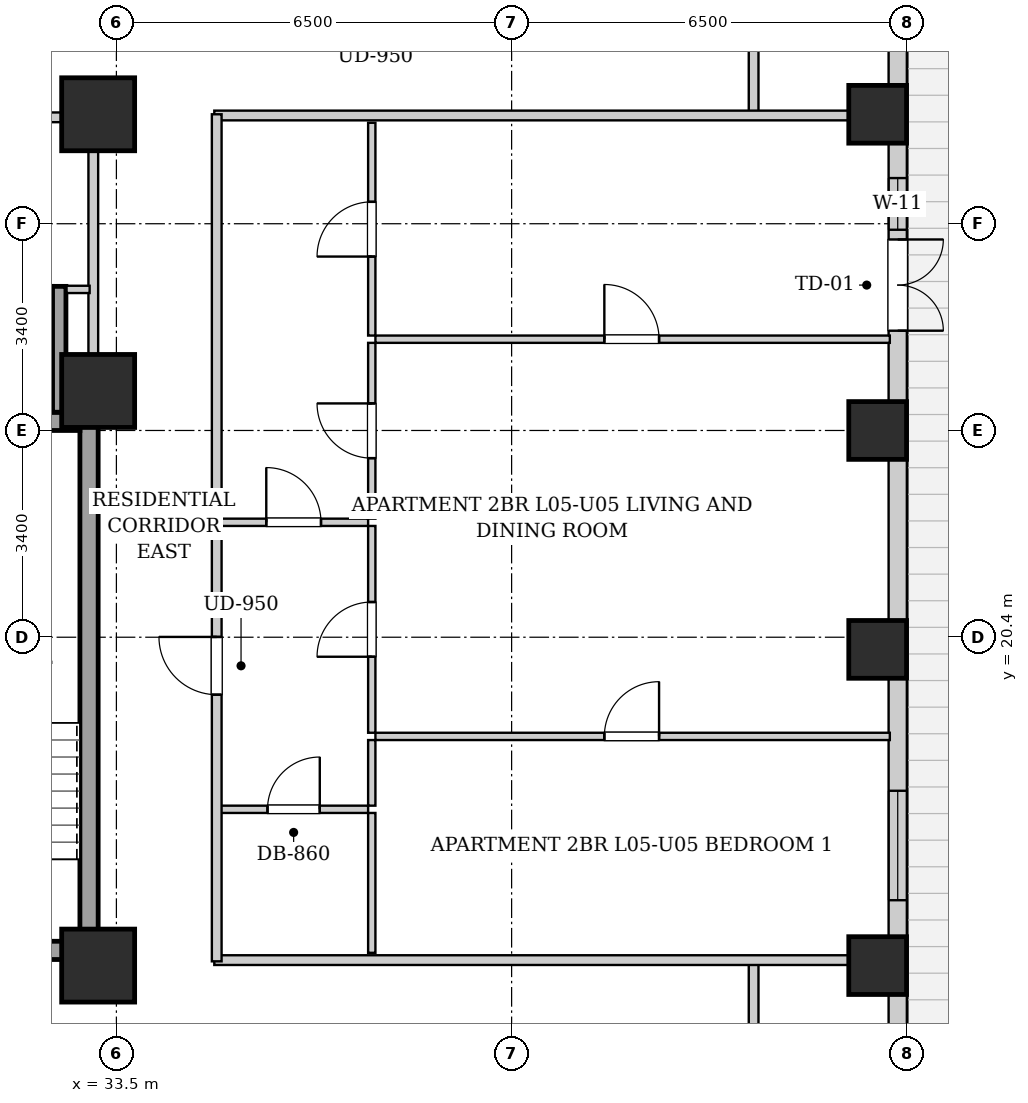
"""IFC4 building model, lengths in metres.
Left out: names, types, materials, properties, quantities, classifications, styles, units other than length and angle.
Written with IfcOpenShell. Run it as: python <this file> out.ifc"""

import sys

from ifc_helpers import new_model, si_unit, direction, frame, frame_2d, origin, origin_2d, place, context, subcontext, project, spatial, rectangle, extrude, element, fill, save


model = new_model("IFC4")
c1 = context("Model", 3, precision=1e-05, world=origin(), true_north=direction((0.0, 1.0)))
c2 = subcontext(c1, "Body", "Model", "MODEL_VIEW")
j1 = project(units=[si_unit("LENGTHUNIT", "METRE"), si_unit("PLANEANGLEUNIT", "RADIAN")], contexts=[c1])
p1 = place(None, origin())
s1 = spatial("IfcSite", under=j1, at=p1, CompositionType="ELEMENT")
p2 = place(p1, origin())
s2 = spatial("IfcBuilding", under=s1, at=p2, CompositionType="ELEMENT")
p3 = place(p2, frame((0.0, 0.0, 25.8)))
s3 = spatial("IfcBuildingStorey", under=s2, at=p3, CompositionType="ELEMENT", Elevation=25.8)
for number, where, z_axis, x_axis in (
    (1, (46.02, 15.0, 0.0), (0.0, 0.0, 1.0), (1.0, 0.0, 0.0)),
    (2, (46.02, 20.2, 0.0), (0.0, 0.0, 1.0), (1.0, 0.0, 0.0)),
    (3, (46.02, 23.8, 0.0), (0.0, 0.0, 1.0), (1.0, 0.0, 0.0)),
    (4, (46.02, 29.0, 0.0), (0.0, 0.0, 1.0), (1.0, 0.0, 0.0)),
):
    element("IfcColumn", number, at=place(p3, frame(where, z_axis=z_axis, x_axis=x_axis)), inside=s3, PredefinedType="COLUMN", context=c2, shape_type="SweptSolid", body=[
        extrude(rectangle(XDim=0.95, YDim=0.95, at=origin_2d()), origin(), (0.0, 0.0, 1.0), 3.2),
    ])
for number, where, z_axis, x_axis in (
    (5, (33.2, 15.0, 0.0), (0.0, 0.0, 1.0), (1.0, 0.0, 0.0)),
    (6, (33.2, 29.0, 0.0), (0.0, 0.0, 1.0), (1.0, 0.0, 0.0)),
    (7, (33.2, 24.45, 0.0), (0.0, 0.0, 1.0), (1.0, 0.0, 0.0)),
):
    element("IfcColumn", number, at=place(p3, frame(where, z_axis=z_axis, x_axis=x_axis)), inside=s3, PredefinedType="COLUMN", context=c2, shape_type="SweptSolid", body=[
        extrude(rectangle(XDim=1.2, YDim=1.2, at=origin_2d()), origin(), (0.0, 0.0, 1.0), 3.2),
    ])
p4 = place(p3, frame((46.35, 45.1, 0.0), z_axis=(0.0, 0.0, 1.0), x_axis=(0.0, -1.0, 0.0)))
e8 = element("IfcWall", 8, at=p4, inside=s3, PredefinedType="SOLIDWALL", context=c2, shape_type="SweptSolid", body=[
    extrude(rectangle(XDim=42.6, YDim=0.3, at=frame_2d((21.3, 0.0))), origin(), (0.0, 0.0, 1.0), 1.988),
])
p5 = place(p4, frame((18.159, 0.0, 0.0)))
e9 = element("IfcOpeningElement", 9, at=p5, cuts=e8, PredefinedType="OPENING", context=c2, shape_type="SweptSolid", body=[
    extrude(rectangle(XDim=1.5, YDim=1.982, at=frame_2d((0.75, 0.991))), frame((0.0, 0.16, 0.0), z_axis=(0.0, -1.0, 0.0), x_axis=(1.0, 0.0, 0.0)), (0.0, 0.0, 1.0), 0.32),
])
p6 = place(p4, frame((37.575, 0.0, 0.55)))
e10 = element("IfcOpeningElement", 10, at=p6, cuts=e8, PredefinedType="OPENING", context=c2, shape_type="SweptSolid", body=[
    extrude(rectangle(XDim=1.8, YDim=1.2, at=frame_2d((0.9, 0.6))), frame((0.0, 0.16, 0.0), z_axis=(0.0, -1.0, 0.0), x_axis=(1.0, 0.0, 0.0)), (0.0, 0.0, 1.0), 0.32),
])
p7 = place(p4, frame((34.85, 0.0, 0.55)))
e11 = element("IfcOpeningElement", 11, at=p7, cuts=e8, PredefinedType="OPENING", context=c2, shape_type="SweptSolid", body=[
    extrude(rectangle(XDim=1.35, YDim=1.2, at=frame_2d((0.675, 0.6))), frame((0.0, 0.16, 0.0), z_axis=(0.0, -1.0, 0.0), x_axis=(1.0, 0.0, 0.0)), (0.0, 0.0, 1.0), 0.32),
])
p8 = place(p4, frame((3.665, 0.0, 0.55)))
e12 = element("IfcOpeningElement", 12, at=p8, cuts=e8, PredefinedType="OPENING", context=c2, shape_type="SweptSolid", body=[
    extrude(rectangle(XDim=1.8, YDim=1.2, at=frame_2d((0.9, 0.6))), frame((0.0, 0.16, 0.0), z_axis=(0.0, -1.0, 0.0), x_axis=(1.0, 0.0, 0.0)), (0.0, 0.0, 1.0), 0.32),
])
p9 = place(p4, frame((1.185, 0.0, 0.55)))
e13 = element("IfcOpeningElement", 13, at=p9, cuts=e8, PredefinedType="OPENING", context=c2, shape_type="SweptSolid", body=[
    extrude(rectangle(XDim=1.35, YDim=1.2, at=frame_2d((0.675, 0.6))), frame((0.0, 0.16, 0.0), z_axis=(0.0, -1.0, 0.0), x_axis=(1.0, 0.0, 0.0)), (0.0, 0.0, 1.0), 0.32),
])
p10 = place(p4, frame((27.225, 0.0, 0.55)))
e14 = element("IfcOpeningElement", 14, at=p10, cuts=e8, PredefinedType="OPENING", context=c2, shape_type="SweptSolid", body=[
    extrude(rectangle(XDim=1.8, YDim=1.2, at=frame_2d((0.9, 0.6))), frame((0.0, 0.16, 0.0), z_axis=(0.0, -1.0, 0.0), x_axis=(1.0, 0.0, 0.0)), (0.0, 0.0, 1.0), 0.32),
])
p11 = place(p4, frame((17.149, 0.0, 0.55)))
e15 = element("IfcOpeningElement", 15, at=p11, cuts=e8, PredefinedType="OPENING", context=c2, shape_type="SweptSolid", body=[
    extrude(rectangle(XDim=0.85, YDim=1.2, at=frame_2d((0.425, 0.6))), frame((0.0, 0.16, 0.0), z_axis=(0.0, -1.0, 0.0), x_axis=(1.0, 0.0, 0.0)), (0.0, 0.0, 1.0), 0.32),
])
p12 = place(p3, frame((33.05, 15.1, 0.0), z_axis=(0.0, 0.0, 1.0), x_axis=(0.0, 1.0, 0.0)))
e16 = element("IfcWall", 16, at=p12, inside=s3, PredefinedType="SHEAR", context=c2, shape_type="SweptSolid", body=[
    extrude(rectangle(XDim=9.0, YDim=0.3, at=frame_2d((4.5, 0.0))), origin(), (0.0, 0.0, 1.0), 2.94),
])
p13 = place(p3, frame((30.05, 23.95, 0.0), z_axis=(0.0, 0.0, 1.0), x_axis=(1.0, 0.0, 0.0)))
e17 = element("IfcWall", 17, at=p13, inside=s3, PredefinedType="SHEAR", context=c2, shape_type="SweptSolid", body=[
    extrude(rectangle(XDim=2.85, YDim=0.3, at=frame_2d((1.425, 0.0))), origin(), (0.0, 0.0, 1.0), 2.94),
])
p14 = place(p3, frame((30.05, 15.25, 0.0), z_axis=(0.0, 0.0, 1.0), x_axis=(1.0, 0.0, 0.0)))
e18 = element("IfcWall", 18, at=p14, inside=s3, PredefinedType="SHEAR", context=c2, shape_type="SweptSolid", body=[
    extrude(rectangle(XDim=2.85, YDim=0.3, at=frame_2d((1.425, 0.0))), origin(), (0.0, 0.0, 1.0), 2.94),
])
p15 = place(p14, frame((0.86, 0.0, 0.0)))
e19 = element("IfcOpeningElement", 19, at=p15, cuts=e18, PredefinedType="OPENING", context=c2, shape_type="SweptSolid", body=[
    extrude(rectangle(XDim=1.1, YDim=2.05, at=frame_2d((0.55, 1.025))), frame((0.0, 0.16, 0.0), z_axis=(0.0, -1.0, 0.0), x_axis=(1.0, 0.0, 0.0)), (0.0, 0.0, 1.0), 0.32),
])
p16 = place(p3, frame((32.56, 24.1, 0.0), z_axis=(0.0, 0.0, 1.0), x_axis=(0.0, 1.0, 0.0)))
e20 = element("IfcWall", 20, at=p16, inside=s3, PredefinedType="SHEAR", context=c2, shape_type="SweptSolid", body=[
    extrude(rectangle(XDim=2.07, YDim=0.22, at=frame_2d((1.035, 0.0))), origin(), (0.0, 0.0, 1.0), 2.94),
])
p17 = place(p3, frame((33.12, 24.12, 0.0), z_axis=(0.0, 0.0, 1.0), x_axis=(0.0, 1.0, 0.0)))
e21 = element("IfcWall", 21, at=p17, inside=s3, PredefinedType="PARTITIONING", context=c2, shape_type="SweptSolid", body=[
    extrude(rectangle(XDim=4.76, YDim=0.16, at=frame_2d((2.38, 0.0))), origin(), (0.0, 0.0, 1.0), 2.94),
])
p18 = place(p3, frame((32.68, 26.12, 0.0), z_axis=(0.0, 0.0, 1.0), x_axis=(1.0, 0.0, 0.0)))
e22 = element("IfcWall", 22, at=p18, inside=s3, PredefinedType="PARTITIONING", context=c2, shape_type="SweptSolid", body=[
    extrude(rectangle(XDim=0.38, YDim=0.12, at=frame_2d((0.19, 0.0))), origin(), (0.0, 0.0, 1.0), 2.94),
])
p19 = place(p3, frame((30.08, 28.95, 0.0), z_axis=(0.0, 0.0, 1.0), x_axis=(1.0, 0.0, 0.0)))
e23 = element("IfcWall", 23, at=p19, inside=s3, PredefinedType="PARTITIONING", context=c2, shape_type="SweptSolid", body=[
    extrude(rectangle(XDim=2.96, YDim=0.16, at=frame_2d((1.48, 0.0))), origin(), (0.0, 0.0, 1.0), 2.94),
])
p20 = place(p19, frame((1.045, 0.0, 0.0)))
e24 = element("IfcOpeningElement", 24, at=p20, cuts=e23, PredefinedType="OPENING", context=c2, shape_type="SweptSolid", body=[
    extrude(rectangle(XDim=0.86, YDim=2.05, at=frame_2d((0.43, 1.025))), frame((0.0, 0.09, 0.0), z_axis=(0.0, -1.0, 0.0), x_axis=(1.0, 0.0, 0.0)), (0.0, 0.0, 1.0), 0.18),
])
for number, where, z_axis, x_axis in (
    (25, (43.98, 13.35, 0.0), (0.0, 0.0, 1.0), (0.0, 1.0, 0.0)),
    (26, (43.98, 28.98, 0.0), (0.0, 0.0, 1.0), (0.0, 1.0, 0.0)),
):
    element("IfcWall", number, at=place(p3, frame(where, z_axis=z_axis, x_axis=x_axis)), inside=s3, PredefinedType="PARTITIONING", context=c2, shape_type="SweptSolid", body=[
        extrude(rectangle(XDim=1.74, YDim=0.16, at=frame_2d((0.87, 0.0))), origin(), (0.0, 0.0, 1.0), 2.94),
    ])
for number, where, z_axis, x_axis in (
    (27, (35.11, 15.09, 0.0), (0.0, 0.0, 1.0), (1.0, 0.0, 0.0)),
    (28, (35.11, 28.98, 0.0), (0.0, 0.0, 1.0), (1.0, 0.0, 0.0)),
):
    element("IfcWall", number, at=place(p3, frame(where, z_axis=z_axis, x_axis=x_axis)), inside=s3, PredefinedType="PARTITIONING", context=c2, shape_type="SweptSolid", body=[
        extrude(rectangle(XDim=11.11, YDim=0.16, at=frame_2d((5.555, 0.0))), origin(), (0.0, 0.0, 1.0), 2.155),
    ])
p21 = place(p3, frame((35.19, 22.29, 0.0), z_axis=(0.0, 0.0, 1.0), x_axis=(1.0, 0.0, 0.0)))
e29 = element("IfcWall", 29, at=p21, inside=s3, PredefinedType="PARTITIONING", context=c2, shape_type="SweptSolid", body=[
    extrude(rectangle(XDim=2.45, YDim=0.12, at=frame_2d((1.225, 0.0))), origin(), (0.0, 0.0, 1.0), 2.94),
])
p22 = place(p21, frame((0.775, 0.0, 0.0)))
e30 = element("IfcOpeningElement", 30, at=p22, cuts=e29, PredefinedType="OPENING", context=c2, shape_type="SweptSolid", body=[
    extrude(rectangle(XDim=0.9, YDim=2.05, at=frame_2d((0.45, 1.025))), frame((0.0, 0.07, 0.0), z_axis=(0.0, -1.0, 0.0), x_axis=(1.0, 0.0, 0.0)), (0.0, 0.0, 1.0), 0.14),
])
p23 = place(p3, frame((37.7, 22.35, 0.0), z_axis=(0.0, 0.0, 1.0), x_axis=(0.0, 1.0, 0.0)))
e31 = element("IfcWall", 31, at=p23, inside=s3, PredefinedType="PARTITIONING", context=c2, shape_type="SweptSolid", body=[
    extrude(rectangle(XDim=2.891, YDim=0.12, at=frame_2d((1.445, 0.0))), origin(), (0.0, 0.0, 1.0), 2.94),
])
p24 = place(p23, frame((0.995, 0.0, 0.0)))
e32 = element("IfcOpeningElement", 32, at=p24, cuts=e31, PredefinedType="OPENING", context=c2, shape_type="SweptSolid", body=[
    extrude(rectangle(XDim=0.9, YDim=2.05, at=frame_2d((0.45, 1.025))), frame((0.0, 0.07, 0.0), z_axis=(0.0, -1.0, 0.0), x_axis=(1.0, 0.0, 0.0)), (0.0, 0.0, 1.0), 0.14),
])
p25 = place(p3, frame((37.7, 25.361, 0.0), z_axis=(0.0, 0.0, 1.0), x_axis=(0.0, 1.0, 0.0)))
e33 = element("IfcWall", 33, at=p25, inside=s3, PredefinedType="PARTITIONING", context=c2, shape_type="SweptSolid", body=[
    extrude(rectangle(XDim=3.499, YDim=0.12, at=frame_2d((1.75, 0.0))), origin(), (0.0, 0.0, 1.0), 2.94),
])
p26 = place(p25, frame((1.299, 0.0, 0.0)))
e34 = element("IfcOpeningElement", 34, at=p26, cuts=e33, PredefinedType="OPENING", context=c2, shape_type="SweptSolid", body=[
    extrude(rectangle(XDim=0.9, YDim=2.05, at=frame_2d((0.45, 1.025))), frame((0.0, 0.07, 0.0), z_axis=(0.0, -1.0, 0.0), x_axis=(1.0, 0.0, 0.0)), (0.0, 0.0, 1.0), 0.14),
])
p27 = place(p3, frame((35.19, 17.57, 0.0), z_axis=(0.0, 0.0, 1.0), x_axis=(1.0, 0.0, 0.0)))
e35 = element("IfcWall", 35, at=p27, inside=s3, PredefinedType="PARTITIONING", context=c2, shape_type="SweptSolid", body=[
    extrude(rectangle(XDim=2.45, YDim=0.12, at=frame_2d((1.225, 0.0))), origin(), (0.0, 0.0, 1.0), 2.94),
])
p28 = place(p27, frame((0.795, 0.0, 0.0)))
e36 = element("IfcOpeningElement", 36, at=p28, cuts=e35, PredefinedType="OPENING", context=c2, shape_type="SweptSolid", body=[
    extrude(rectangle(XDim=0.86, YDim=2.05, at=frame_2d((0.43, 1.025))), frame((0.0, 0.07, 0.0), z_axis=(0.0, -1.0, 0.0), x_axis=(1.0, 0.0, 0.0)), (0.0, 0.0, 1.0), 0.14),
])
p29 = place(p3, frame((37.7, 15.21, 0.0), z_axis=(0.0, 0.0, 1.0), x_axis=(0.0, 1.0, 0.0)))
e37 = element("IfcWall", 37, at=p29, inside=s3, PredefinedType="PARTITIONING", context=c2, shape_type="SweptSolid", body=[
    extrude(rectangle(XDim=2.3, YDim=0.12, at=frame_2d((1.15, 0.0))), origin(), (0.0, 0.0, 1.0), 2.94),
])
p30 = place(p3, frame((37.7, 17.63, 0.0), z_axis=(0.0, 0.0, 1.0), x_axis=(0.0, 1.0, 0.0)))
e38 = element("IfcWall", 38, at=p30, inside=s3, PredefinedType="PARTITIONING", context=c2, shape_type="SweptSolid", body=[
    extrude(rectangle(XDim=1.079, YDim=0.12, at=frame_2d((0.54, 0.0))), origin(), (0.0, 0.0, 1.0), 2.94),
])
p31 = place(p3, frame((37.7, 18.829, 0.0), z_axis=(0.0, 0.0, 1.0), x_axis=(0.0, 1.0, 0.0)))
e39 = element("IfcWall", 39, at=p31, inside=s3, PredefinedType="PARTITIONING", context=c2, shape_type="SweptSolid", body=[
    extrude(rectangle(XDim=3.401, YDim=0.12, at=frame_2d((1.7, 0.0))), origin(), (0.0, 0.0, 1.0), 2.94),
])
p32 = place(p31, frame((1.25, 0.0, 0.0)))
e40 = element("IfcOpeningElement", 40, at=p32, cuts=e39, PredefinedType="OPENING", context=c2, shape_type="SweptSolid", body=[
    extrude(rectangle(XDim=0.9, YDim=2.05, at=frame_2d((0.45, 1.025))), frame((0.0, 0.07, 0.0), z_axis=(0.0, -1.0, 0.0), x_axis=(1.0, 0.0, 0.0)), (0.0, 0.0, 1.0), 0.14),
])
p33 = place(p3, frame((37.76, 18.769, 0.0), z_axis=(0.0, 0.0, 1.0), x_axis=(1.0, 0.0, 0.0)))
e41 = element("IfcWall", 41, at=p33, inside=s3, PredefinedType="PARTITIONING", context=c2, shape_type="SweptSolid", body=[
    extrude(rectangle(XDim=8.46, YDim=0.12, at=frame_2d((4.23, 0.0))), origin(), (0.0, 0.0, 1.0), 2.94),
])
p34 = place(p33, frame((3.765, 0.0, 0.0)))
e42 = element("IfcOpeningElement", 42, at=p34, cuts=e41, PredefinedType="OPENING", context=c2, shape_type="SweptSolid", body=[
    extrude(rectangle(XDim=0.9, YDim=2.05, at=frame_2d((0.45, 1.025))), frame((0.0, 0.07, 0.0), z_axis=(0.0, -1.0, 0.0), x_axis=(1.0, 0.0, 0.0)), (0.0, 0.0, 1.0), 0.14),
])
p35 = place(p3, frame((37.76, 25.301, 0.0), z_axis=(0.0, 0.0, 1.0), x_axis=(1.0, 0.0, 0.0)))
e43 = element("IfcWall", 43, at=p35, inside=s3, PredefinedType="PARTITIONING", context=c2, shape_type="SweptSolid", body=[
    extrude(rectangle(XDim=8.46, YDim=0.12, at=frame_2d((4.23, 0.0))), origin(), (0.0, 0.0, 1.0), 2.94),
])
p36 = place(p35, frame((3.765, 0.0, 0.0)))
e44 = element("IfcOpeningElement", 44, at=p36, cuts=e43, PredefinedType="OPENING", context=c2, shape_type="SweptSolid", body=[
    extrude(rectangle(XDim=0.9, YDim=2.05, at=frame_2d((0.45, 1.025))), frame((0.0, 0.07, 0.0), z_axis=(0.0, -1.0, 0.0), x_axis=(1.0, 0.0, 0.0)), (0.0, 0.0, 1.0), 0.14),
])
p37 = place(p3, frame((35.15, 15.07, 0.0), z_axis=(0.0, 0.0, 1.0), x_axis=(0.0, 1.0, 0.0)))
e45 = element("IfcWall", 45, at=p37, inside=s3, PredefinedType="PARTITIONING", context=c2, shape_type="SweptSolid", body=[
    extrude(rectangle(XDim=13.93, YDim=0.16, at=frame_2d((6.965, 0.0))), origin(), (0.0, 0.0, 1.0), 2.94),
])
p38 = place(p37, frame((4.385, 0.0, 0.0)))
e46 = element("IfcOpeningElement", 46, at=p38, cuts=e45, PredefinedType="OPENING", context=c2, shape_type="SweptSolid", body=[
    extrude(rectangle(XDim=0.95, YDim=2.1, at=frame_2d((0.475, 1.05))), frame((0.0, 0.09, 0.0), z_axis=(0.0, -1.0, 0.0), x_axis=(1.0, 0.0, 0.0)), (0.0, 0.0, 1.0), 0.18),
])
p39 = place(p22, origin())
e47 = element("IfcDoor", 47, at=p39, inside=s3, OperationType="SINGLE_SWING_LEFT", PredefinedType="DOOR", context=c2, shape_type="SweptSolid", body=[
    extrude(rectangle(XDim=0.9, YDim=2.05, at=frame_2d((0.45, 1.025))), frame((0.0, 0.025, 0.0), z_axis=(0.0, -1.0, 0.0), x_axis=(1.0, 0.0, 0.0)), (0.0, 0.0, 1.0), 0.05),
])
fill(e30, e47)
p40 = place(p24, origin())
e48 = element("IfcDoor", 48, at=p40, inside=s3, OperationType="SINGLE_SWING_RIGHT", PredefinedType="DOOR", context=c2, shape_type="SweptSolid", body=[
    extrude(rectangle(XDim=0.9, YDim=2.05, at=frame_2d((0.45, 1.025))), frame((0.0, 0.025, 0.0), z_axis=(0.0, -1.0, 0.0), x_axis=(1.0, 0.0, 0.0)), (0.0, 0.0, 1.0), 0.05),
])
fill(e32, e48)
p41 = place(p26, origin())
e49 = element("IfcDoor", 49, at=p41, inside=s3, OperationType="SINGLE_SWING_LEFT", PredefinedType="DOOR", context=c2, shape_type="SweptSolid", body=[
    extrude(rectangle(XDim=0.9, YDim=2.05, at=frame_2d((0.45, 1.025))), frame((0.0, 0.025, 0.0), z_axis=(0.0, -1.0, 0.0), x_axis=(1.0, 0.0, 0.0)), (0.0, 0.0, 1.0), 0.05),
])
fill(e34, e49)
p42 = place(p28, origin())
e50 = element("IfcDoor", 50, at=p42, inside=s3, OperationType="SINGLE_SWING_RIGHT", PredefinedType="DOOR", context=c2, shape_type="SweptSolid", body=[
    extrude(rectangle(XDim=0.86, YDim=2.05, at=frame_2d((0.43, 1.025))), frame((0.0, 0.025, 0.0), z_axis=(0.0, -1.0, 0.0), x_axis=(1.0, 0.0, 0.0)), (0.0, 0.0, 1.0), 0.05),
])
fill(e36, e50)
p43 = place(p32, origin())
e51 = element("IfcDoor", 51, at=p43, inside=s3, OperationType="SINGLE_SWING_LEFT", PredefinedType="DOOR", context=c2, shape_type="SweptSolid", body=[
    extrude(rectangle(XDim=0.9, YDim=2.05, at=frame_2d((0.45, 1.025))), frame((0.0, 0.025, 0.0), z_axis=(0.0, -1.0, 0.0), x_axis=(1.0, 0.0, 0.0)), (0.0, 0.0, 1.0), 0.05),
])
fill(e40, e51)
p44 = place(p34, origin())
e52 = element("IfcDoor", 52, at=p44, inside=s3, OperationType="SINGLE_SWING_RIGHT", PredefinedType="DOOR", context=c2, shape_type="SweptSolid", body=[
    extrude(rectangle(XDim=0.9, YDim=2.05, at=frame_2d((0.45, 1.025))), frame((0.0, 0.025, 0.0), z_axis=(0.0, -1.0, 0.0), x_axis=(1.0, 0.0, 0.0)), (0.0, 0.0, 1.0), 0.05),
])
fill(e42, e52)
p45 = place(p36, origin())
e53 = element("IfcDoor", 53, at=p45, inside=s3, OperationType="SINGLE_SWING_LEFT", PredefinedType="DOOR", context=c2, shape_type="SweptSolid", body=[
    extrude(rectangle(XDim=0.9, YDim=2.05, at=frame_2d((0.45, 1.025))), frame((0.0, 0.025, 0.0), z_axis=(0.0, -1.0, 0.0), x_axis=(1.0, 0.0, 0.0)), (0.0, 0.0, 1.0), 0.05),
])
fill(e44, e53)
p46 = place(p38, origin())
e54 = element("IfcDoor", 54, at=p46, inside=s3, OperationType="SINGLE_SWING_RIGHT", PredefinedType="DOOR", context=c2, shape_type="SweptSolid", body=[
    extrude(rectangle(XDim=0.95, YDim=2.1, at=frame_2d((0.475, 1.05))), frame((0.0, 0.025, 0.0), z_axis=(0.0, -1.0, 0.0), x_axis=(1.0, 0.0, 0.0)), (0.0, 0.0, 1.0), 0.05),
])
fill(e46, e54)
p47 = place(p5, origin())
e55 = element("IfcDoor", 55, at=p47, inside=s3, OperationType="DOUBLE_SWING_LEFT", PredefinedType="DOOR", context=c2, shape_type="SweptSolid", body=[
    extrude(rectangle(XDim=1.5, YDim=1.982, at=frame_2d((0.75, 0.991))), frame((0.0, 0.025, 0.0), z_axis=(0.0, -1.0, 0.0), x_axis=(1.0, 0.0, 0.0)), (0.0, 0.0, 1.0), 0.05),
])
fill(e9, e55)
p48 = place(p10, origin())
e56 = element("IfcWindow", 56, at=p48, inside=s3, PartitioningType="DOUBLE_PANEL_VERTICAL", PredefinedType="WINDOW", context=c2, shape_type="SweptSolid", body=[
    extrude(rectangle(XDim=1.8, YDim=1.2, at=frame_2d((0.9, 0.6))), frame((0.0, 0.03, 0.0), z_axis=(0.0, -1.0, 0.0), x_axis=(1.0, 0.0, 0.0)), (0.0, 0.0, 1.0), 0.06),
])
fill(e14, e56)
p49 = place(p11, origin())
e57 = element("IfcWindow", 57, at=p49, inside=s3, PartitioningType="SINGLE_PANEL", PredefinedType="WINDOW", context=c2, shape_type="SweptSolid", body=[
    extrude(rectangle(XDim=0.85, YDim=1.2, at=frame_2d((0.425, 0.6))), frame((0.0, 0.03, 0.0), z_axis=(0.0, -1.0, 0.0), x_axis=(1.0, 0.0, 0.0)), (0.0, 0.0, 1.0), 0.06),
])
fill(e15, e57)
save(model, sys.argv[1])
